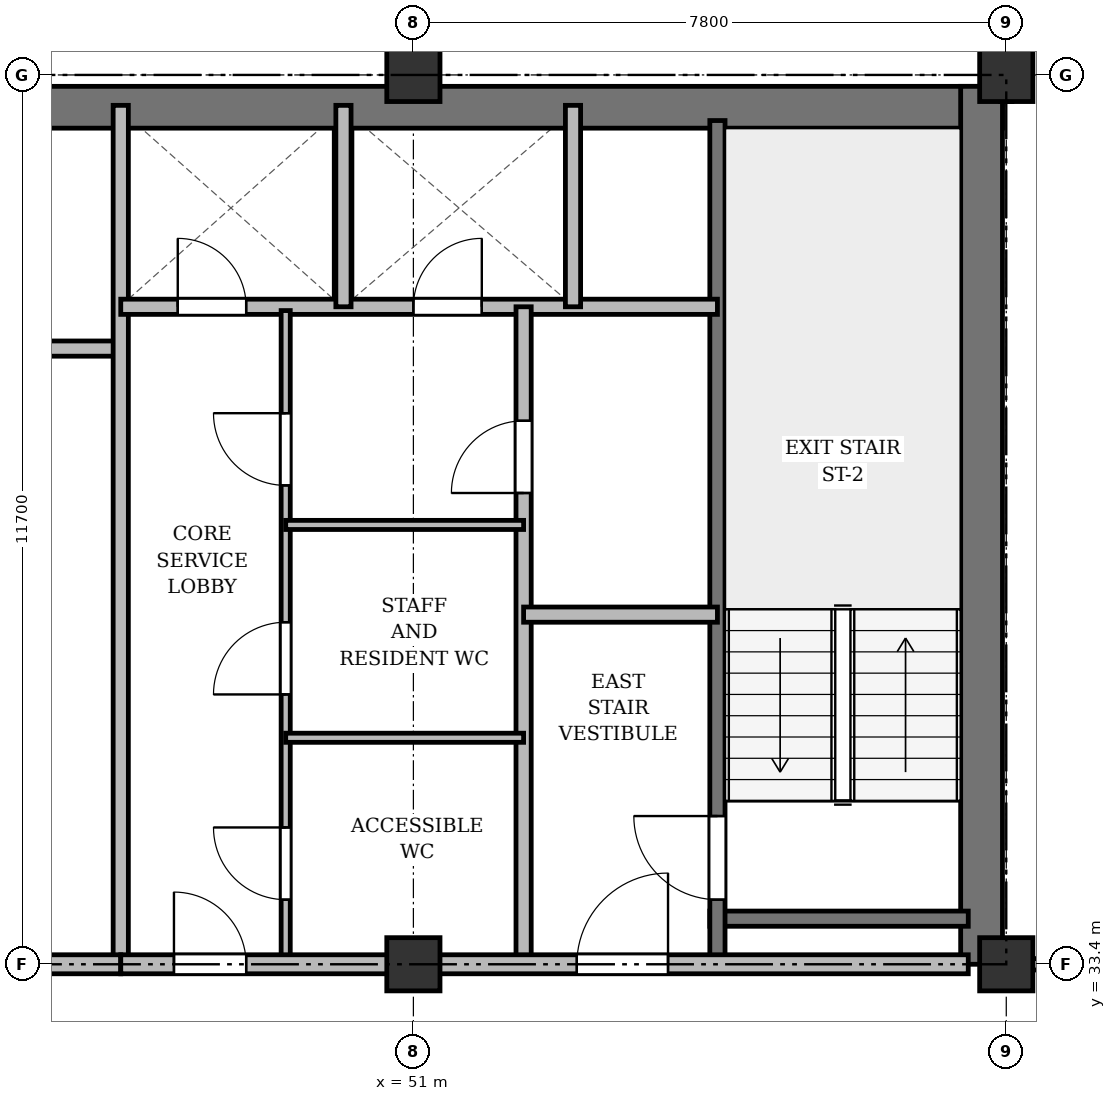
"""IFC4 building model, lengths in metres.
Left out: names, types, materials, properties, quantities, classifications, styles, units other than length and angle.
Written with IfcOpenShell. Run it as: python <this file> out.ifc"""

import sys

from ifc_helpers import new_model, si_unit, direction, frame, frame_2d, origin, origin_2d, place, context, subcontext, project, spatial, rectangle, extrude, source, transform, mapped, element, fill, save


model = new_model("IFC4")
c1 = context("Model", 3, precision=1e-05, world=origin(), true_north=direction((0.0, 1.0)))
c2 = subcontext(c1, "Body", "Model", "MODEL_VIEW")
j1 = project(units=[si_unit("LENGTHUNIT", "METRE"), si_unit("PLANEANGLEUNIT", "RADIAN")], contexts=[c1])
p1 = place(None, origin())
s1 = spatial("IfcSite", under=j1, at=p1, CompositionType="ELEMENT")
p2 = place(p1, origin())
s2 = spatial("IfcBuilding", under=s1, at=p2, CompositionType="ELEMENT")
p3 = place(p2, frame((0.0, 0.0, 190.5)))
s3 = spatial("IfcBuildingStorey", under=s2, at=p3, CompositionType="ELEMENT", Elevation=190.5)
m1 = source(origin(), c2, "Body", "SweptSolid", [
    extrude(rectangle(XDim=0.7, YDim=0.7, at=origin_2d()), origin(), (0.0, 0.0, 1.0), 3.6),
])
for number, where, z_axis, x_axis in (
    (1, (51.0, 33.4, 0.0), (0.0, 0.0, 1.0), (1.0, 0.0, 0.0)),
    (2, (51.0, 45.1, 0.0), (0.0, 0.0, 1.0), (1.0, 0.0, 0.0)),
    (3, (58.8, 33.4, 0.0), (0.0, 0.0, 1.0), (1.0, 0.0, 0.0)),
    (4, (58.8, 45.1, 0.0), (0.0, 0.0, 1.0), (1.0, 0.0, 0.0)),
):
    element("IfcColumn", number, at=place(p3, frame(where, z_axis=z_axis, x_axis=x_axis)), inside=s3, PredefinedType="COLUMN", context=c2, shape_type="MappedRepresentation", body=[
        mapped(m1, transform((0.0, 0.0, 0.0), x_axis=(1.0, 0.0, 0.0), y_axis=(0.0, 1.0, 0.0), z_axis=(0.0, 0.0, 1.0), scale=1.0)),
    ])
p4 = place(p3, frame((15.65, 44.675, 0.0), z_axis=(0.0, 0.0, 1.0), x_axis=(1.0, 0.0, 0.0)))
e5 = element("IfcWall", 5, at=p4, inside=s3, PredefinedType="SHEAR", context=c2, shape_type="SweptSolid", body=[
    extrude(rectangle(XDim=43.1, YDim=0.55, at=frame_2d((21.55, 0.0))), origin(), (0.0, 0.0, 1.0), 3.36),
])
p5 = place(p3, frame((58.475, 33.4, 0.0), z_axis=(0.0, 0.0, 1.0), x_axis=(0.0, 1.0, 0.0)))
e6 = element("IfcWall", 6, at=p5, inside=s3, PredefinedType="SHEAR", context=c2, shape_type="SweptSolid", body=[
    extrude(rectangle(XDim=11.55, YDim=0.55, at=frame_2d((5.775, 0.0))), origin(), (0.0, 0.0, 1.0), 3.36),
])
p6 = place(p3, frame((54.9, 34.0, 0.0), z_axis=(0.0, 0.0, 1.0), x_axis=(1.0, 0.0, 0.0)))
e7 = element("IfcWall", 7, at=p6, inside=s3, PredefinedType="SHEAR", context=c2, shape_type="SweptSolid", body=[
    extrude(rectangle(XDim=3.4, YDim=0.2, at=frame_2d((1.7, 0.0))), origin(), (0.0, 0.0, 1.0), 3.36),
])
p7 = place(p3, frame((55.0, 33.4, 0.0), z_axis=(0.0, 0.0, 1.0), x_axis=(0.0, 1.0, 0.0)))
e8 = element("IfcWall", 8, at=p7, inside=s3, PredefinedType="SHEAR", context=c2, shape_type="SweptSolid", body=[
    extrude(rectangle(XDim=11.1, YDim=0.2, at=frame_2d((5.55, 0.0))), origin(), (0.0, 0.0, 1.0), 3.36),
])
p8 = place(p7, frame((0.85, 0.0, 0.0)))
e9 = element("IfcOpeningElement", 9, at=p8, cuts=e8, PredefinedType="OPENING", context=c2, shape_type="SweptSolid", body=[
    extrude(rectangle(XDim=1.1, YDim=2.15, at=frame_2d((0.55, 1.075))), frame((0.0, 0.11, 0.0), z_axis=(0.0, -1.0, 0.0), x_axis=(1.0, 0.0, 0.0)), (0.0, 0.0, 1.0), 0.22),
])
p9 = place(p3, frame((40.25, 41.5, 0.0), z_axis=(0.0, 0.0, 1.0), x_axis=(1.0, 0.0, 0.0)))
e10 = element("IfcWall", 10, at=p9, inside=s3, PredefinedType="SOLIDWALL", context=c2, shape_type="SweptSolid", body=[
    extrude(rectangle(XDim=6.9, YDim=0.2, at=frame_2d((3.45, 0.0))), origin(), (0.0, 0.0, 1.0), 2.86),
])
p10 = place(p3, frame((47.15, 33.4, 0.0), z_axis=(0.0, 0.0, 1.0), x_axis=(0.0, 1.0, 0.0)))
e11 = element("IfcWall", 11, at=p10, inside=s3, PredefinedType="SOLIDWALL", context=c2, shape_type="SweptSolid", body=[
    extrude(rectangle(XDim=11.3, YDim=0.2, at=frame_2d((5.65, 0.0))), origin(), (0.0, 0.0, 1.0), 2.91),
])
p11 = place(p3, frame((33.3, 33.4, 0.0), z_axis=(0.0, 0.0, 1.0), x_axis=(1.0, 0.0, 0.0)))
e12 = element("IfcWall", 12, at=p11, inside=s3, PredefinedType="PARTITIONING", context=c2, shape_type="SweptSolid", body=[
    extrude(rectangle(XDim=13.85, YDim=0.25, at=frame_2d((6.925, 0.0))), origin(), (0.0, 0.0, 1.0), 2.91),
])
p12 = place(p11, frame((4.2, 0.0, 0.0)))
e13 = element("IfcOpeningElement", 13, at=p12, cuts=e12, PredefinedType="OPENING", context=c2, shape_type="SweptSolid", body=[
    extrude(rectangle(XDim=1.6, YDim=2.2, at=frame_2d((0.8, 1.1))), frame((0.0, 0.135, 0.0), z_axis=(0.0, -1.0, 0.0), x_axis=(1.0, 0.0, 0.0)), (0.0, 0.0, 1.0), 0.27),
])
p13 = place(p3, frame((47.15, 42.05, 0.0), z_axis=(0.0, 0.0, 1.0), x_axis=(1.0, 0.0, 0.0)))
e14 = element("IfcWall", 14, at=p13, inside=s3, PredefinedType="SOLIDWALL", context=c2, shape_type="SweptSolid", body=[
    extrude(rectangle(XDim=7.85, YDim=0.2, at=frame_2d((3.925, 0.0))), origin(), (0.0, 0.0, 1.0), 2.86),
])
p14 = place(p13, frame((0.75, 0.0, 0.0)))
e15 = element("IfcOpeningElement", 15, at=p14, cuts=e14, PredefinedType="OPENING", context=c2, shape_type="SweptSolid", body=[
    extrude(rectangle(XDim=0.9, YDim=2.1, at=frame_2d((0.45, 1.05))), frame((0.0, 0.11, 0.0), z_axis=(0.0, -1.0, 0.0), x_axis=(1.0, 0.0, 0.0)), (0.0, 0.0, 1.0), 0.22),
])
p15 = place(p13, frame((3.85, 0.0, 0.0)))
e16 = element("IfcOpeningElement", 16, at=p15, cuts=e14, PredefinedType="OPENING", context=c2, shape_type="SweptSolid", body=[
    extrude(rectangle(XDim=0.9, YDim=2.1, at=frame_2d((0.45, 1.05))), frame((0.0, 0.11, 0.0), z_axis=(0.0, -1.0, 0.0), x_axis=(1.0, 0.0, 0.0)), (0.0, 0.0, 1.0), 0.22),
])
for number, where, z_axis, x_axis in (
    (17, (50.08, 42.05, 0.0), (0.0, 0.0, 1.0), (0.0, 1.0, 0.0)),
    (18, (53.1, 42.05, 0.0), (0.0, 0.0, 1.0), (0.0, 1.0, 0.0)),
):
    element("IfcWall", number, at=place(p3, frame(where, z_axis=z_axis, x_axis=x_axis)), inside=s3, PredefinedType="SOLIDWALL", context=c2, shape_type="SweptSolid", body=[
        extrude(rectangle(XDim=2.65, YDim=0.2, at=frame_2d((1.325, 0.0))), origin(), (0.0, 0.0, 1.0), 3.36),
    ])
p16 = place(p3, frame((52.45, 33.4, 0.0), z_axis=(0.0, 0.0, 1.0), x_axis=(0.0, 1.0, 0.0)))
e19 = element("IfcWall", 19, at=p16, inside=s3, PredefinedType="PARTITIONING", context=c2, shape_type="SweptSolid", body=[
    extrude(rectangle(XDim=8.65, YDim=0.2, at=frame_2d((4.325, 0.0))), origin(), (0.0, 0.0, 1.0), 2.91),
])
p17 = place(p16, frame((6.2, 0.0, 0.0)))
e20 = element("IfcOpeningElement", 20, at=p17, cuts=e19, PredefinedType="OPENING", context=c2, shape_type="SweptSolid", body=[
    extrude(rectangle(XDim=0.95, YDim=2.15, at=frame_2d((0.475, 1.075))), frame((0.0, 0.11, 0.0), z_axis=(0.0, -1.0, 0.0), x_axis=(1.0, 0.0, 0.0)), (0.0, 0.0, 1.0), 0.22),
])
p18 = place(p3, frame((52.45, 38.0, 0.0), z_axis=(0.0, 0.0, 1.0), x_axis=(1.0, 0.0, 0.0)))
e21 = element("IfcWall", 21, at=p18, inside=s3, PredefinedType="PARTITIONING", context=c2, shape_type="SweptSolid", body=[
    extrude(rectangle(XDim=2.55, YDim=0.2, at=frame_2d((1.275, 0.0))), origin(), (0.0, 0.0, 1.0), 3.36),
])
p19 = place(p3, frame((49.32, 33.4, 0.0), z_axis=(0.0, 0.0, 1.0), x_axis=(0.0, 1.0, 0.0)))
e22 = element("IfcWall", 22, at=p19, inside=s3, PredefinedType="PARTITIONING", context=c2, shape_type="SweptSolid", body=[
    extrude(rectangle(XDim=8.6, YDim=0.12, at=frame_2d((4.3, 0.0))), origin(), (0.0, 0.0, 1.0), 2.91),
])
p20 = place(p19, frame((0.85, 0.0, 0.0)))
e23 = element("IfcOpeningElement", 23, at=p20, cuts=e22, PredefinedType="OPENING", context=c2, shape_type="SweptSolid", body=[
    extrude(rectangle(XDim=0.95, YDim=2.15, at=frame_2d((0.475, 1.075))), frame((0.0, 0.07, 0.0), z_axis=(0.0, -1.0, 0.0), x_axis=(1.0, 0.0, 0.0)), (0.0, 0.0, 1.0), 0.14),
])
p21 = place(p19, frame((3.55, 0.0, 0.0)))
e24 = element("IfcOpeningElement", 24, at=p21, cuts=e22, PredefinedType="OPENING", context=c2, shape_type="SweptSolid", body=[
    extrude(rectangle(XDim=0.95, YDim=2.15, at=frame_2d((0.475, 1.075))), frame((0.0, 0.07, 0.0), z_axis=(0.0, -1.0, 0.0), x_axis=(1.0, 0.0, 0.0)), (0.0, 0.0, 1.0), 0.14),
])
p22 = place(p19, frame((6.3, 0.0, 0.0)))
e25 = element("IfcOpeningElement", 25, at=p22, cuts=e22, PredefinedType="OPENING", context=c2, shape_type="SweptSolid", body=[
    extrude(rectangle(XDim=0.95, YDim=2.15, at=frame_2d((0.475, 1.075))), frame((0.0, 0.07, 0.0), z_axis=(0.0, -1.0, 0.0), x_axis=(1.0, 0.0, 0.0)), (0.0, 0.0, 1.0), 0.14),
])
for number, where, z_axis, x_axis in (
    (26, (49.32, 36.38, 0.0), (0.0, 0.0, 1.0), (1.0, 0.0, 0.0)),
    (27, (49.32, 39.18, 0.0), (0.0, 0.0, 1.0), (1.0, 0.0, 0.0)),
):
    element("IfcWall", number, at=place(p3, frame(where, z_axis=z_axis, x_axis=x_axis)), inside=s3, PredefinedType="PARTITIONING", context=c2, shape_type="SweptSolid", body=[
        extrude(rectangle(XDim=3.13, YDim=0.12, at=frame_2d((1.565, 0.0))), origin(), (0.0, 0.0, 1.0), 2.86),
    ])
p23 = place(p3, frame((47.15, 33.4, 0.0), z_axis=(0.0, 0.0, 1.0), x_axis=(1.0, 0.0, 0.0)))
e28 = element("IfcWall", 28, at=p23, inside=s3, PredefinedType="PARTITIONING", context=c2, shape_type="SweptSolid", body=[
    extrude(rectangle(XDim=11.15, YDim=0.25, at=frame_2d((5.575, 0.0))), origin(), (0.0, 0.0, 1.0), 2.91),
])
p24 = place(p23, frame((0.7, 0.0, 0.0)))
e29 = element("IfcOpeningElement", 29, at=p24, cuts=e28, PredefinedType="OPENING", context=c2, shape_type="SweptSolid", body=[
    extrude(rectangle(XDim=0.95, YDim=2.15, at=frame_2d((0.475, 1.075))), frame((0.0, 0.135, 0.0), z_axis=(0.0, -1.0, 0.0), x_axis=(1.0, 0.0, 0.0)), (0.0, 0.0, 1.0), 0.27),
])
p25 = place(p23, frame((6.0, 0.0, 0.0)))
e30 = element("IfcOpeningElement", 30, at=p25, cuts=e28, PredefinedType="OPENING", context=c2, shape_type="SweptSolid", body=[
    extrude(rectangle(XDim=1.2, YDim=2.15, at=frame_2d((0.6, 1.075))), frame((0.0, 0.135, 0.0), z_axis=(0.0, -1.0, 0.0), x_axis=(1.0, 0.0, 0.0)), (0.0, 0.0, 1.0), 0.27),
])
p26 = place(p3, frame((58.8, 33.4, 0.0), z_axis=(0.0, 0.0, 1.0), x_axis=(1.0, 0.0, 0.0)))
e31 = element("IfcWall", 31, at=p26, inside=s3, PredefinedType="PARTITIONING", context=c2, shape_type="SweptSolid", body=[
    extrude(rectangle(XDim=7.35, YDim=0.15, at=frame_2d((3.675, 0.0))), origin(), (0.0, 0.0, 1.0), 2.91),
])
p27 = place(p26, frame((3.192, 0.0, 0.0)))
e32 = element("IfcOpeningElement", 32, at=p27, cuts=e31, PredefinedType="OPENING", context=c2, shape_type="SweptSolid", body=[
    extrude(rectangle(XDim=0.95, YDim=2.15, at=frame_2d((0.475, 1.075))), frame((0.0, 0.085, 0.0), z_axis=(0.0, -1.0, 0.0), x_axis=(1.0, 0.0, 0.0)), (0.0, 0.0, 1.0), 0.17),
])
p28 = place(p3, frame((58.8, 44.75, 0.0), z_axis=(0.0, 0.0, 1.0), x_axis=(0.0, 1.0, 0.0)))
e33 = element("IfcWall", 33, at=p28, inside=s3, PredefinedType="PARTITIONING", context=c2, shape_type="SweptSolid", body=[
    extrude(rectangle(XDim=3.61, YDim=0.15, at=frame_2d((1.805, 0.0))), origin(), (0.0, 0.0, 1.0), 2.86),
])
p29 = place(p28, frame((1.1, 0.0, 0.0)))
e34 = element("IfcOpeningElement", 34, at=p29, cuts=e33, PredefinedType="OPENING", context=c2, shape_type="SweptSolid", body=[
    extrude(rectangle(XDim=0.95, YDim=2.15, at=frame_2d((0.475, 1.075))), frame((0.0, 0.085, 0.0), z_axis=(0.0, -1.0, 0.0), x_axis=(1.0, 0.0, 0.0)), (0.0, 0.0, 1.0), 0.17),
])
m2 = source(origin(), c2, "Body", "SweptSolid", [
    extrude(rectangle(XDim=1.1, YDim=2.15, at=frame_2d((0.55, 1.075))), frame((0.0, 0.025, 0.0), z_axis=(0.0, -1.0, 0.0), x_axis=(1.0, 0.0, 0.0)), (0.0, 0.0, 1.0), 0.05),
])
p30 = place(p8, origin())
e35 = element("IfcDoor", 35, at=p30, inside=s3, OperationType="SINGLE_SWING_RIGHT", PredefinedType="DOOR", context=c2, shape_type="MappedRepresentation", body=[
    mapped(m2, transform((0.0, 0.0, 0.0), x_axis=(1.0, 0.0, 0.0), y_axis=(0.0, 1.0, 0.0), z_axis=(0.0, 0.0, 1.0), scale=1.0)),
])
fill(e9, e35)
m3 = source(origin(), c2, "Body", "SweptSolid", [
    extrude(rectangle(XDim=0.9, YDim=2.1, at=frame_2d((0.45, 1.05))), frame((0.0, 0.025, 0.0), z_axis=(0.0, -1.0, 0.0), x_axis=(1.0, 0.0, 0.0)), (0.0, 0.0, 1.0), 0.05),
])
p31 = place(p14, origin())
e36 = element("IfcDoor", 36, at=p31, inside=s3, OperationType="SINGLE_SWING_LEFT", PredefinedType="DOOR", context=c2, shape_type="MappedRepresentation", body=[
    mapped(m3, transform((0.0, 0.0, 0.0), x_axis=(1.0, 0.0, 0.0), y_axis=(0.0, 1.0, 0.0), z_axis=(0.0, 0.0, 1.0), scale=1.0)),
])
fill(e15, e36)
p32 = place(p15, origin())
e37 = element("IfcDoor", 37, at=p32, inside=s3, OperationType="SINGLE_SWING_RIGHT", PredefinedType="DOOR", context=c2, shape_type="MappedRepresentation", body=[
    mapped(m3, transform((0.0, 0.0, 0.0), x_axis=(1.0, 0.0, 0.0), y_axis=(0.0, 1.0, 0.0), z_axis=(0.0, 0.0, 1.0), scale=1.0)),
])
fill(e16, e37)
m4 = source(origin(), c2, "Body", "SweptSolid", [
    extrude(rectangle(XDim=0.95, YDim=2.15, at=frame_2d((0.475, 1.075))), frame((0.0, 0.025, 0.0), z_axis=(0.0, -1.0, 0.0), x_axis=(1.0, 0.0, 0.0)), (0.0, 0.0, 1.0), 0.05),
])
p33 = place(p17, origin())
e38 = element("IfcDoor", 38, at=p33, inside=s3, OperationType="SINGLE_SWING_LEFT", PredefinedType="DOOR", context=c2, shape_type="MappedRepresentation", body=[
    mapped(m4, transform((0.0, 0.0, 0.0), x_axis=(1.0, 0.0, 0.0), y_axis=(0.0, 1.0, 0.0), z_axis=(0.0, 0.0, 1.0), scale=1.0)),
])
fill(e20, e38)
p34 = place(p20, origin())
e39 = element("IfcDoor", 39, at=p34, inside=s3, OperationType="SINGLE_SWING_RIGHT", PredefinedType="DOOR", context=c2, shape_type="MappedRepresentation", body=[
    mapped(m4, transform((0.0, 0.0, 0.0), x_axis=(1.0, 0.0, 0.0), y_axis=(0.0, 1.0, 0.0), z_axis=(0.0, 0.0, 1.0), scale=1.0)),
])
fill(e23, e39)
p35 = place(p21, origin())
e40 = element("IfcDoor", 40, at=p35, inside=s3, OperationType="SINGLE_SWING_LEFT", PredefinedType="DOOR", context=c2, shape_type="MappedRepresentation", body=[
    mapped(m4, transform((0.0, 0.0, 0.0), x_axis=(1.0, 0.0, 0.0), y_axis=(0.0, 1.0, 0.0), z_axis=(0.0, 0.0, 1.0), scale=1.0)),
])
fill(e24, e40)
p36 = place(p22, origin())
e41 = element("IfcDoor", 41, at=p36, inside=s3, OperationType="SINGLE_SWING_RIGHT", PredefinedType="DOOR", context=c2, shape_type="MappedRepresentation", body=[
    mapped(m4, transform((0.0, 0.0, 0.0), x_axis=(1.0, 0.0, 0.0), y_axis=(0.0, 1.0, 0.0), z_axis=(0.0, 0.0, 1.0), scale=1.0)),
])
fill(e25, e41)
p37 = place(p24, origin())
e42 = element("IfcDoor", 42, at=p37, inside=s3, OperationType="SINGLE_SWING_LEFT", PredefinedType="DOOR", context=c2, shape_type="MappedRepresentation", body=[
    mapped(m4, transform((0.0, 0.0, 0.0), x_axis=(1.0, 0.0, 0.0), y_axis=(0.0, 1.0, 0.0), z_axis=(0.0, 0.0, 1.0), scale=1.0)),
])
fill(e29, e42)
m5 = source(origin(), c2, "Body", "SweptSolid", [
    extrude(rectangle(XDim=1.2, YDim=2.15, at=frame_2d((0.6, 1.075))), frame((0.0, 0.025, 0.0), z_axis=(0.0, -1.0, 0.0), x_axis=(1.0, 0.0, 0.0)), (0.0, 0.0, 1.0), 0.05),
])
p38 = place(p25, origin())
e43 = element("IfcDoor", 43, at=p38, inside=s3, OperationType="SINGLE_SWING_RIGHT", PredefinedType="DOOR", context=c2, shape_type="MappedRepresentation", body=[
    mapped(m5, transform((0.0, 0.0, 0.0), x_axis=(1.0, 0.0, 0.0), y_axis=(0.0, 1.0, 0.0), z_axis=(0.0, 0.0, 1.0), scale=1.0)),
])
fill(e30, e43)
save(model, sys.argv[1])
